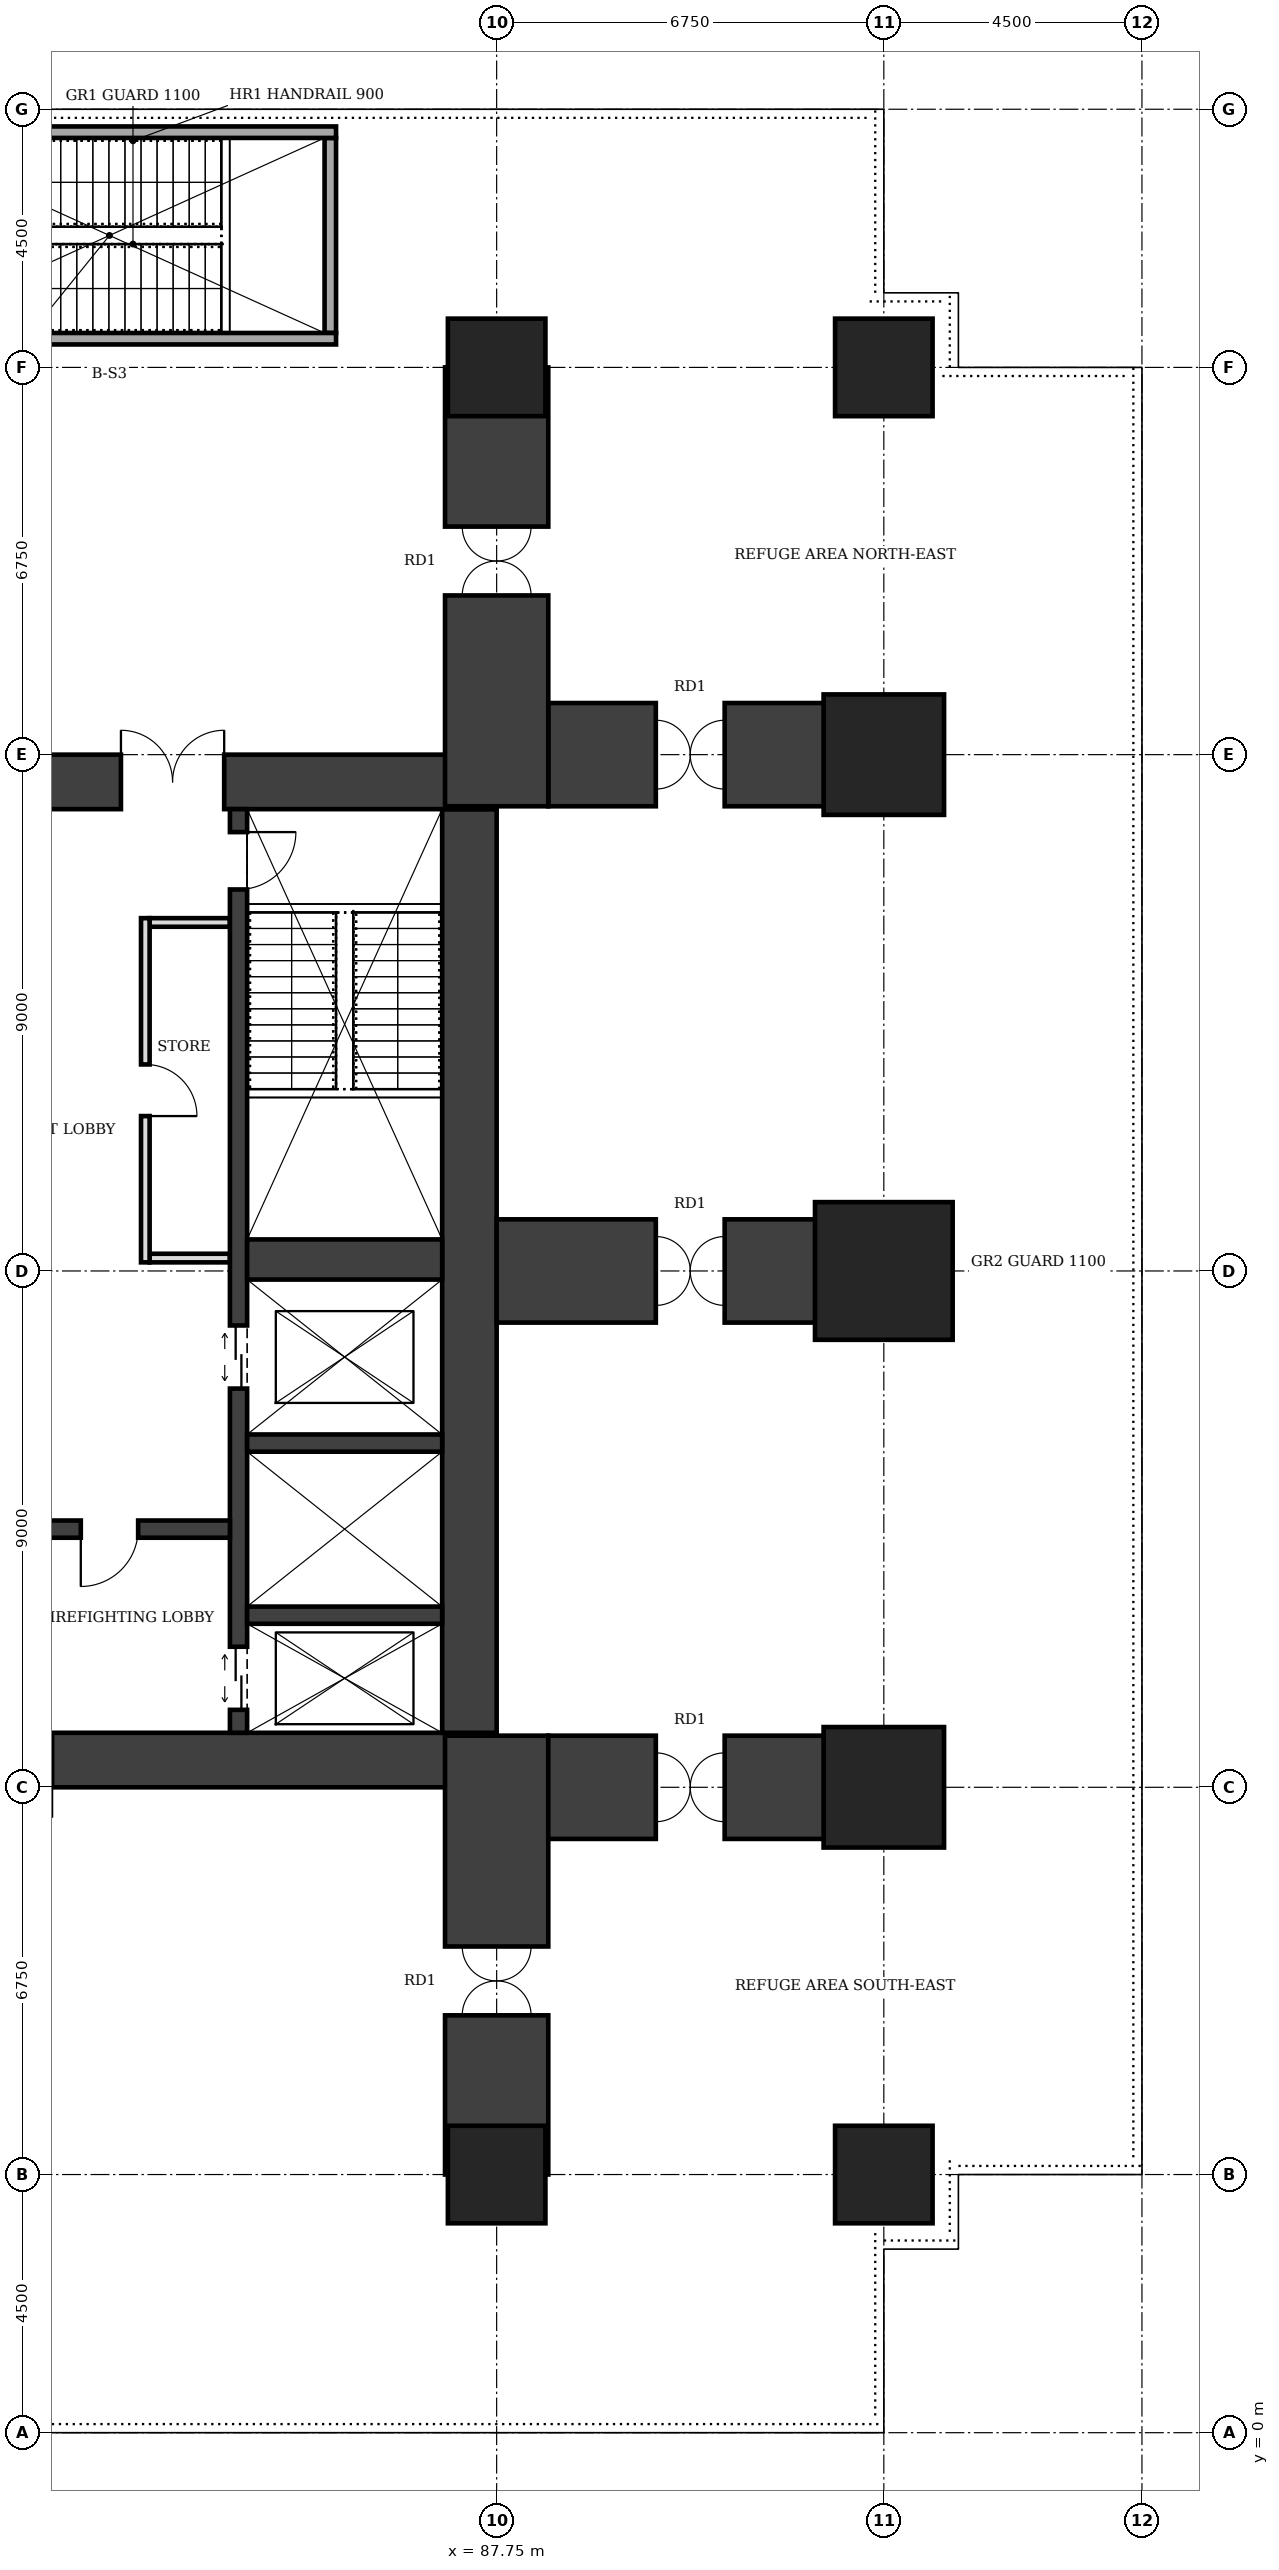
"""IFC4 building model, lengths in metres.
Left out: names, types, materials, properties, quantities, classifications, styles, units other than length and angle.
Written with IfcOpenShell. Run it as: python <this file> out.ifc"""

import sys

from ifc_helpers import new_model, si_unit, direction, frame, frame_2d, origin, origin_2d, place, context, subcontext, project, spatial, rectangle, extrude, element, fill, save


model = new_model("IFC4")
c1 = context("Model", 3, precision=1e-05, world=origin(), true_north=direction((0.0, 1.0)))
c2 = subcontext(c1, "Body", "Model", "MODEL_VIEW")
j1 = project(units=[si_unit("LENGTHUNIT", "METRE"), si_unit("PLANEANGLEUNIT", "RADIAN")], contexts=[c1])
p1 = place(None, origin())
s1 = spatial("IfcSite", under=j1, at=p1, CompositionType="ELEMENT")
p2 = place(p1, origin())
s2 = spatial("IfcBuilding", under=s1, at=p2, CompositionType="ELEMENT")
p3 = place(p2, frame((0.0, 0.0, 77.0)))
s3 = spatial("IfcBuildingStorey", under=s2, at=p3, CompositionType="ELEMENT", Elevation=77.0)
p4 = place(p3, frame((74.25, 11.725, 0.0), z_axis=(0.0, 0.0, 1.0), x_axis=(1.0, 0.0, 0.0)))
e1 = element("IfcWall", 1, at=p4, inside=s3, PredefinedType="SHEAR", context=c2, shape_type="SweptSolid", body=[
    extrude(rectangle(XDim=13.5, YDim=0.95, at=frame_2d((6.75, 0.0))), origin(), (0.0, 0.0, 1.0), 8.0),
])
p5 = place(p4, frame((4.75, 0.0, 0.0)))
e2 = element("IfcOpeningElement", 2, at=p5, cuts=e1, PredefinedType="OPENING", context=c2, shape_type="SweptSolid", body=[
    extrude(rectangle(XDim=1.0, YDim=2.1, at=frame_2d((0.5, 1.05))), frame((0.0, 0.485, 0.0), z_axis=(0.0, -1.0, 0.0), x_axis=(1.0, 0.0, 0.0)), (0.0, 0.0, 1.0), 0.97),
])
p6 = place(p3, frame((87.275, 12.2, 0.0), z_axis=(0.0, 0.0, 1.0), x_axis=(0.0, 1.0, 0.0)))
e3 = element("IfcWall", 3, at=p6, inside=s3, PredefinedType="SHEAR", context=c2, shape_type="SweptSolid", body=[
    extrude(rectangle(XDim=16.1, YDim=0.95, at=frame_2d((8.05, 0.0))), origin(), (0.0, 0.0, 1.0), 8.0),
])
p7 = place(p3, frame((87.75, 28.775, 0.0), z_axis=(0.0, 0.0, 1.0), x_axis=(-1.0, 0.0, 0.0)))
e4 = element("IfcWall", 4, at=p7, inside=s3, PredefinedType="SHEAR", context=c2, shape_type="SweptSolid", body=[
    extrude(rectangle(XDim=13.5, YDim=0.95, at=frame_2d((6.75, 0.0))), origin(), (0.0, 0.0, 1.0), 8.0),
])
p8 = place(p7, frame((4.75, 0.0, 0.0)))
e5 = element("IfcOpeningElement", 5, at=p8, cuts=e4, PredefinedType="OPENING", context=c2, shape_type="SweptSolid", body=[
    extrude(rectangle(XDim=1.8, YDim=2.1, at=frame_2d((0.9, 1.05))), frame((0.0, 0.485, 0.0), z_axis=(0.0, -1.0, 0.0), x_axis=(1.0, 0.0, 0.0)), (0.0, 0.0, 1.0), 0.97),
])
p9 = place(p3, frame((83.25, 12.2, 0.0), z_axis=(0.0, 0.0, 1.0), x_axis=(0.0, 1.0, 0.0)))
e6 = element("IfcWall", 6, at=p9, inside=s3, PredefinedType="SHEAR", context=c2, shape_type="SweptSolid", body=[
    extrude(rectangle(XDim=16.1, YDim=0.3, at=frame_2d((8.05, 0.0))), origin(), (0.0, 0.0, 1.0), 8.0),
])
p10 = place(p9, frame((14.7, 0.0, 0.0)))
e7 = element("IfcOpeningElement", 7, at=p10, cuts=e6, PredefinedType="OPENING", context=c2, shape_type="SweptSolid", body=[
    extrude(rectangle(XDim=1.0, YDim=2.1, at=frame_2d((0.5, 1.05))), frame((0.0, 0.16, 0.0), z_axis=(0.0, -1.0, 0.0), x_axis=(1.0, 0.0, 0.0)), (0.0, 0.0, 1.0), 0.32),
])
p11 = place(p9, frame((0.4, 0.0, 0.0)))
e8 = element("IfcOpeningElement", 8, at=p11, cuts=e6, PredefinedType="OPENING", context=c2, shape_type="SweptSolid", body=[
    extrude(rectangle(XDim=1.1, YDim=2.1, at=frame_2d((0.55, 1.05))), frame((0.0, 0.16, 0.0), z_axis=(0.0, -1.0, 0.0), x_axis=(1.0, 0.0, 0.0)), (0.0, 0.0, 1.0), 0.32),
])
p12 = place(p9, frame((6.0, 0.0, 0.0)))
e9 = element("IfcOpeningElement", 9, at=p12, cuts=e6, PredefinedType="OPENING", context=c2, shape_type="SweptSolid", body=[
    extrude(rectangle(XDim=1.1, YDim=2.1, at=frame_2d((0.55, 1.05))), frame((0.0, 0.16, 0.0), z_axis=(0.0, -1.0, 0.0), x_axis=(1.0, 0.0, 0.0)), (0.0, 0.0, 1.0), 0.32),
])
p13 = place(p3, frame((78.9, 15.75, 0.0), z_axis=(0.0, 0.0, 1.0), x_axis=(1.0, 0.0, 0.0)))
e10 = element("IfcWall", 10, at=p13, inside=s3, PredefinedType="SHEAR", context=c2, shape_type="SweptSolid", body=[
    extrude(rectangle(XDim=4.2, YDim=0.3, at=frame_2d((2.1, 0.0))), origin(), (0.0, 0.0, 1.0), 8.0),
])
p14 = place(p13, frame((1.6, 0.0, 0.0)))
e11 = element("IfcOpeningElement", 11, at=p14, cuts=e10, PredefinedType="OPENING", context=c2, shape_type="SweptSolid", body=[
    extrude(rectangle(XDim=1.0, YDim=2.1, at=frame_2d((0.5, 1.05))), frame((0.0, 0.16, 0.0), z_axis=(0.0, -1.0, 0.0), x_axis=(1.0, 0.0, 0.0)), (0.0, 0.0, 1.0), 0.32),
])
for number, where, z_axis, x_axis in (
    (12, (83.4, 14.25, 0.0), (0.0, 0.0, 1.0), (1.0, 0.0, 0.0)),
    (13, (83.4, 17.25, 0.0), (0.0, 0.0, 1.0), (1.0, 0.0, 0.0)),
):
    element("IfcWall", number, at=place(p3, frame(where, z_axis=z_axis, x_axis=x_axis)), inside=s3, PredefinedType="SHEAR", context=c2, shape_type="SweptSolid", body=[
        extrude(rectangle(XDim=3.4, YDim=0.3, at=frame_2d((1.7, 0.0))), origin(), (0.0, 0.0, 1.0), 8.0),
    ])
p15 = place(p3, frame((83.4, 20.45, 0.0), z_axis=(0.0, 0.0, 1.0), x_axis=(1.0, 0.0, 0.0)))
e14 = element("IfcWall", 14, at=p15, inside=s3, PredefinedType="SHEAR", context=c2, shape_type="SweptSolid", body=[
    extrude(rectangle(XDim=3.4, YDim=0.7, at=frame_2d((1.7, 0.0))), origin(), (0.0, 0.0, 1.0), 8.0),
])
for number, where, z_axis, x_axis in (
    (15, (87.75, 4.5, 0.0), (0.0, 0.0, 1.0), (1.0, 0.0, 0.0)),
    (16, (94.5, 4.5, 0.0), (0.0, 0.0, 1.0), (1.0, 0.0, 0.0)),
):
    element("IfcColumn", number, at=place(p3, frame(where, z_axis=z_axis, x_axis=x_axis)), inside=s3, PredefinedType="COLUMN", context=c2, shape_type="SweptSolid", body=[
        extrude(rectangle(XDim=1.7, YDim=1.7, at=origin_2d()), origin(), (0.0, 0.0, 1.0), 8.0),
    ])
p16 = place(p3, frame((94.5, 11.25, 0.0), z_axis=(0.0, 0.0, 1.0), x_axis=(1.0, 0.0, 0.0)))
e17 = element("IfcColumn", 17, at=p16, inside=s3, PredefinedType="COLUMN", context=c2, shape_type="SweptSolid", body=[
    extrude(rectangle(XDim=2.1, YDim=2.1, at=origin_2d()), origin(), (0.0, 0.0, 1.0), 8.0),
])
p17 = place(p3, frame((94.5, 20.25, 0.0), z_axis=(0.0, 0.0, 1.0), x_axis=(1.0, 0.0, 0.0)))
e18 = element("IfcColumn", 18, at=p17, inside=s3, PredefinedType="COLUMN", context=c2, shape_type="SweptSolid", body=[
    extrude(rectangle(XDim=2.4, YDim=2.4, at=origin_2d()), origin(), (0.0, 0.0, 1.0), 8.0),
])
p18 = place(p3, frame((94.5, 29.25, 0.0), z_axis=(0.0, 0.0, 1.0), x_axis=(1.0, 0.0, 0.0)))
e19 = element("IfcColumn", 19, at=p18, inside=s3, PredefinedType="COLUMN", context=c2, shape_type="SweptSolid", body=[
    extrude(rectangle(XDim=2.1, YDim=2.1, at=origin_2d()), origin(), (0.0, 0.0, 1.0), 8.0),
])
for number, where, z_axis, x_axis in (
    (20, (87.75, 36.0, 0.0), (0.0, 0.0, 1.0), (1.0, 0.0, 0.0)),
    (21, (94.5, 36.0, 0.0), (0.0, 0.0, 1.0), (1.0, 0.0, 0.0)),
):
    element("IfcColumn", number, at=place(p3, frame(where, z_axis=z_axis, x_axis=x_axis)), inside=s3, PredefinedType="COLUMN", context=c2, shape_type="SweptSolid", body=[
        extrude(rectangle(XDim=1.7, YDim=1.7, at=origin_2d()), origin(), (0.0, 0.0, 1.0), 8.0),
    ])
p19 = place(p3, frame((87.75, 4.5, 0.0), z_axis=(0.0, 0.0, 1.0), x_axis=(0.0, 1.0, 0.0)))
e22 = element("IfcWall", 22, at=p19, inside=s3, PredefinedType="SHEAR", context=c2, shape_type="SweptSolid", body=[
    extrude(rectangle(XDim=7.65, YDim=1.8, at=frame_2d((3.825, 0.0))), origin(), (0.0, 0.0, 1.0), 8.0),
])
p20 = place(p19, frame((2.775, 0.0, 0.0)))
e23 = element("IfcOpeningElement", 23, at=p20, cuts=e22, PredefinedType="OPENING", context=c2, shape_type="SweptSolid", body=[
    extrude(rectangle(XDim=1.2, YDim=2.1, at=frame_2d((0.6, 1.05))), frame((0.0, 0.91, 0.0), z_axis=(0.0, -1.0, 0.0), x_axis=(1.0, 0.0, 0.0)), (0.0, 0.0, 1.0), 1.82),
])
p21 = place(p3, frame((87.75, 28.35, 0.0), z_axis=(0.0, 0.0, 1.0), x_axis=(0.0, 1.0, 0.0)))
e24 = element("IfcWall", 24, at=p21, inside=s3, PredefinedType="SHEAR", context=c2, shape_type="SweptSolid", body=[
    extrude(rectangle(XDim=7.65, YDim=1.8, at=frame_2d((3.825, 0.0))), origin(), (0.0, 0.0, 1.0), 8.0),
])
p22 = place(p21, frame((3.675, 0.0, 0.0)))
e25 = element("IfcOpeningElement", 25, at=p22, cuts=e24, PredefinedType="OPENING", context=c2, shape_type="SweptSolid", body=[
    extrude(rectangle(XDim=1.2, YDim=2.1, at=frame_2d((0.6, 1.05))), frame((0.0, 0.91, 0.0), z_axis=(0.0, -1.0, 0.0), x_axis=(1.0, 0.0, 0.0)), (0.0, 0.0, 1.0), 1.82),
])
p23 = place(p3, frame((87.75, 20.25, 0.0), z_axis=(0.0, 0.0, 1.0), x_axis=(1.0, 0.0, 0.0)))
e26 = element("IfcWall", 26, at=p23, inside=s3, PredefinedType="SHEAR", context=c2, shape_type="SweptSolid", body=[
    extrude(rectangle(XDim=6.75, YDim=1.8, at=frame_2d((3.375, 0.0))), origin(), (0.0, 0.0, 1.0), 8.0),
])
p24 = place(p23, frame((2.775, 0.0, 0.0)))
e27 = element("IfcOpeningElement", 27, at=p24, cuts=e26, PredefinedType="OPENING", context=c2, shape_type="SweptSolid", body=[
    extrude(rectangle(XDim=1.2, YDim=2.1, at=frame_2d((0.6, 1.05))), frame((0.0, 0.91, 0.0), z_axis=(0.0, -1.0, 0.0), x_axis=(1.0, 0.0, 0.0)), (0.0, 0.0, 1.0), 1.82),
])
p25 = place(p3, frame((88.65, 11.25, 0.0), z_axis=(0.0, 0.0, 1.0), x_axis=(1.0, 0.0, 0.0)))
e28 = element("IfcWall", 28, at=p25, inside=s3, PredefinedType="SHEAR", context=c2, shape_type="SweptSolid", body=[
    extrude(rectangle(XDim=5.85, YDim=1.8, at=frame_2d((2.925, 0.0))), origin(), (0.0, 0.0, 1.0), 8.0),
])
p26 = place(p25, frame((1.875, 0.0, 0.0)))
e29 = element("IfcOpeningElement", 29, at=p26, cuts=e28, PredefinedType="OPENING", context=c2, shape_type="SweptSolid", body=[
    extrude(rectangle(XDim=1.2, YDim=2.1, at=frame_2d((0.6, 1.05))), frame((0.0, 0.91, 0.0), z_axis=(0.0, -1.0, 0.0), x_axis=(1.0, 0.0, 0.0)), (0.0, 0.0, 1.0), 1.82),
])
p27 = place(p3, frame((88.65, 29.25, 0.0), z_axis=(0.0, 0.0, 1.0), x_axis=(1.0, 0.0, 0.0)))
e30 = element("IfcWall", 30, at=p27, inside=s3, PredefinedType="SHEAR", context=c2, shape_type="SweptSolid", body=[
    extrude(rectangle(XDim=5.85, YDim=1.8, at=frame_2d((2.925, 0.0))), origin(), (0.0, 0.0, 1.0), 8.0),
])
p28 = place(p27, frame((1.875, 0.0, 0.0)))
e31 = element("IfcOpeningElement", 31, at=p28, cuts=e30, PredefinedType="OPENING", context=c2, shape_type="SweptSolid", body=[
    extrude(rectangle(XDim=1.2, YDim=2.1, at=frame_2d((0.6, 1.05))), frame((0.0, 0.91, 0.0), z_axis=(0.0, -1.0, 0.0), x_axis=(1.0, 0.0, 0.0)), (0.0, 0.0, 1.0), 1.82),
])
p29 = place(p3, frame((81.625, 20.4, 0.0), z_axis=(0.0, 0.0, 1.0), x_axis=(0.0, 1.0, 0.0)))
e32 = element("IfcWall", 32, at=p29, inside=s3, PredefinedType="PARTITIONING", context=c2, shape_type="SweptSolid", body=[
    extrude(rectangle(XDim=6.0, YDim=0.15, at=frame_2d((3.0, 0.0))), origin(), (0.0, 0.0, 1.0), 7.75),
])
p30 = place(p29, frame((2.55, 0.0, 0.0)))
e33 = element("IfcOpeningElement", 33, at=p30, cuts=e32, PredefinedType="OPENING", context=c2, shape_type="SweptSolid", body=[
    extrude(rectangle(XDim=0.9, YDim=2.1, at=frame_2d((0.45, 1.05))), frame((0.0, 0.085, 0.0), z_axis=(0.0, -1.0, 0.0), x_axis=(1.0, 0.0, 0.0)), (0.0, 0.0, 1.0), 0.17),
])
for number, where, z_axis, x_axis in (
    (34, (81.7, 20.475, 0.0), (0.0, 0.0, 1.0), (1.0, 0.0, 0.0)),
    (35, (81.7, 26.325, 0.0), (0.0, 0.0, 1.0), (1.0, 0.0, 0.0)),
):
    element("IfcWall", number, at=place(p3, frame(where, z_axis=z_axis, x_axis=x_axis)), inside=s3, PredefinedType="PARTITIONING", context=c2, shape_type="SweptSolid", body=[
        extrude(rectangle(XDim=1.4, YDim=0.15, at=frame_2d((0.7, 0.0))), origin(), (0.0, 0.0, 1.0), 7.75),
    ])
for number, where, z_axis, x_axis in (
    (36, (77.05, 36.5, 0.0), (0.0, 0.0, 1.0), (1.0, 0.0, 0.0)),
    (37, (77.05, 40.1, 0.0), (0.0, 0.0, 1.0), (1.0, 0.0, 0.0)),
):
    element("IfcWall", number, at=place(p3, frame(where, z_axis=z_axis, x_axis=x_axis)), inside=s3, PredefinedType="SOLIDWALL", context=c2, shape_type="SweptSolid", body=[
        extrude(rectangle(XDim=7.9, YDim=0.2, at=frame_2d((3.95, 0.0))), origin(), (0.0, 0.0, 1.0), 7.75),
    ])
p31 = place(p3, frame((84.85, 36.6, 0.0), z_axis=(0.0, 0.0, 1.0), x_axis=(0.0, 1.0, 0.0)))
e38 = element("IfcWall", 38, at=p31, inside=s3, PredefinedType="SOLIDWALL", context=c2, shape_type="SweptSolid", body=[
    extrude(rectangle(XDim=3.4, YDim=0.2, at=frame_2d((1.7, 0.0))), origin(), (0.0, 0.0, 1.0), 7.75),
])
p32 = place(p8, frame((1.8, 0.0, 0.0), z_axis=(0.0, 0.0, 1.0), x_axis=(-1.0, 0.0, 0.0)))
e39 = element("IfcDoor", 39, at=p32, inside=s3, OperationType="DOUBLE_DOOR_SINGLE_SWING", PredefinedType="DOOR", context=c2, shape_type="SweptSolid", body=[
    extrude(rectangle(XDim=1.8, YDim=2.1, at=frame_2d((0.9, 1.05))), frame((0.0, 0.025, 0.0), z_axis=(0.0, -1.0, 0.0), x_axis=(1.0, 0.0, 0.0)), (0.0, 0.0, 1.0), 0.05),
])
fill(e5, e39)
p33 = place(p14, frame((1.0, 0.0, 0.0), z_axis=(0.0, 0.0, 1.0), x_axis=(-1.0, 0.0, 0.0)))
e40 = element("IfcDoor", 40, at=p33, inside=s3, OperationType="SINGLE_SWING_RIGHT", PredefinedType="DOOR", context=c2, shape_type="SweptSolid", body=[
    extrude(rectangle(XDim=1.0, YDim=2.1, at=frame_2d((0.5, 1.05))), frame((0.0, 0.025, 0.0), z_axis=(0.0, -1.0, 0.0), x_axis=(1.0, 0.0, 0.0)), (0.0, 0.0, 1.0), 0.05),
])
fill(e11, e40)
p34 = place(p10, frame((1.0, 0.0, 0.0), z_axis=(0.0, 0.0, 1.0), x_axis=(-1.0, 0.0, 0.0)))
e41 = element("IfcDoor", 41, at=p34, inside=s3, OperationType="SINGLE_SWING_LEFT", PredefinedType="DOOR", context=c2, shape_type="SweptSolid", body=[
    extrude(rectangle(XDim=1.0, YDim=2.1, at=frame_2d((0.5, 1.05))), frame((0.0, 0.025, 0.0), z_axis=(0.0, -1.0, 0.0), x_axis=(1.0, 0.0, 0.0)), (0.0, 0.0, 1.0), 0.05),
])
fill(e7, e41)
p35 = place(p11, origin())
e42 = element("IfcDoor", 42, at=p35, inside=s3, OperationType="DOUBLE_DOOR_SLIDING", PredefinedType="DOOR", context=c2, shape_type="SweptSolid", body=[
    extrude(rectangle(XDim=1.1, YDim=2.1, at=frame_2d((0.55, 1.05))), frame((0.0, 0.025, 0.0), z_axis=(0.0, -1.0, 0.0), x_axis=(1.0, 0.0, 0.0)), (0.0, 0.0, 1.0), 0.05),
])
fill(e8, e42)
p36 = place(p12, origin())
e43 = element("IfcDoor", 43, at=p36, inside=s3, OperationType="DOUBLE_DOOR_SLIDING", PredefinedType="DOOR", context=c2, shape_type="SweptSolid", body=[
    extrude(rectangle(XDim=1.1, YDim=2.1, at=frame_2d((0.55, 1.05))), frame((0.0, 0.025, 0.0), z_axis=(0.0, -1.0, 0.0), x_axis=(1.0, 0.0, 0.0)), (0.0, 0.0, 1.0), 0.05),
])
fill(e9, e43)
p37 = place(p30, frame((0.9, 0.0, 0.0), z_axis=(0.0, 0.0, 1.0), x_axis=(-1.0, 0.0, 0.0)))
e44 = element("IfcDoor", 44, at=p37, inside=s3, OperationType="SINGLE_SWING_RIGHT", PredefinedType="DOOR", context=c2, shape_type="SweptSolid", body=[
    extrude(rectangle(XDim=0.9, YDim=2.1, at=frame_2d((0.45, 1.05))), frame((0.0, 0.025, 0.0), z_axis=(0.0, -1.0, 0.0), x_axis=(1.0, 0.0, 0.0)), (0.0, 0.0, 1.0), 0.05),
])
fill(e33, e44)
p38 = place(p20, origin())
e45 = element("IfcDoor", 45, at=p38, inside=s3, OperationType="DOUBLE_DOOR_DOUBLE_SWING", PredefinedType="DOOR", context=c2, shape_type="SweptSolid", body=[
    extrude(rectangle(XDim=1.2, YDim=2.1, at=frame_2d((0.6, 1.05))), frame((0.0, 0.025, 0.0), z_axis=(0.0, -1.0, 0.0), x_axis=(1.0, 0.0, 0.0)), (0.0, 0.0, 1.0), 0.05),
])
fill(e23, e45)
p39 = place(p22, origin())
e46 = element("IfcDoor", 46, at=p39, inside=s3, OperationType="DOUBLE_DOOR_DOUBLE_SWING", PredefinedType="DOOR", context=c2, shape_type="SweptSolid", body=[
    extrude(rectangle(XDim=1.2, YDim=2.1, at=frame_2d((0.6, 1.05))), frame((0.0, 0.025, 0.0), z_axis=(0.0, -1.0, 0.0), x_axis=(1.0, 0.0, 0.0)), (0.0, 0.0, 1.0), 0.05),
])
fill(e25, e46)
p40 = place(p24, origin())
e47 = element("IfcDoor", 47, at=p40, inside=s3, OperationType="DOUBLE_DOOR_DOUBLE_SWING", PredefinedType="DOOR", context=c2, shape_type="SweptSolid", body=[
    extrude(rectangle(XDim=1.2, YDim=2.1, at=frame_2d((0.6, 1.05))), frame((0.0, 0.025, 0.0), z_axis=(0.0, -1.0, 0.0), x_axis=(1.0, 0.0, 0.0)), (0.0, 0.0, 1.0), 0.05),
])
fill(e27, e47)
p41 = place(p26, origin())
e48 = element("IfcDoor", 48, at=p41, inside=s3, OperationType="DOUBLE_DOOR_DOUBLE_SWING", PredefinedType="DOOR", context=c2, shape_type="SweptSolid", body=[
    extrude(rectangle(XDim=1.2, YDim=2.1, at=frame_2d((0.6, 1.05))), frame((0.0, 0.025, 0.0), z_axis=(0.0, -1.0, 0.0), x_axis=(1.0, 0.0, 0.0)), (0.0, 0.0, 1.0), 0.05),
])
fill(e29, e48)
p42 = place(p28, origin())
e49 = element("IfcDoor", 49, at=p42, inside=s3, OperationType="DOUBLE_DOOR_DOUBLE_SWING", PredefinedType="DOOR", context=c2, shape_type="SweptSolid", body=[
    extrude(rectangle(XDim=1.2, YDim=2.1, at=frame_2d((0.6, 1.05))), frame((0.0, 0.025, 0.0), z_axis=(0.0, -1.0, 0.0), x_axis=(1.0, 0.0, 0.0)), (0.0, 0.0, 1.0), 0.05),
])
fill(e31, e49)
save(model, sys.argv[1])
